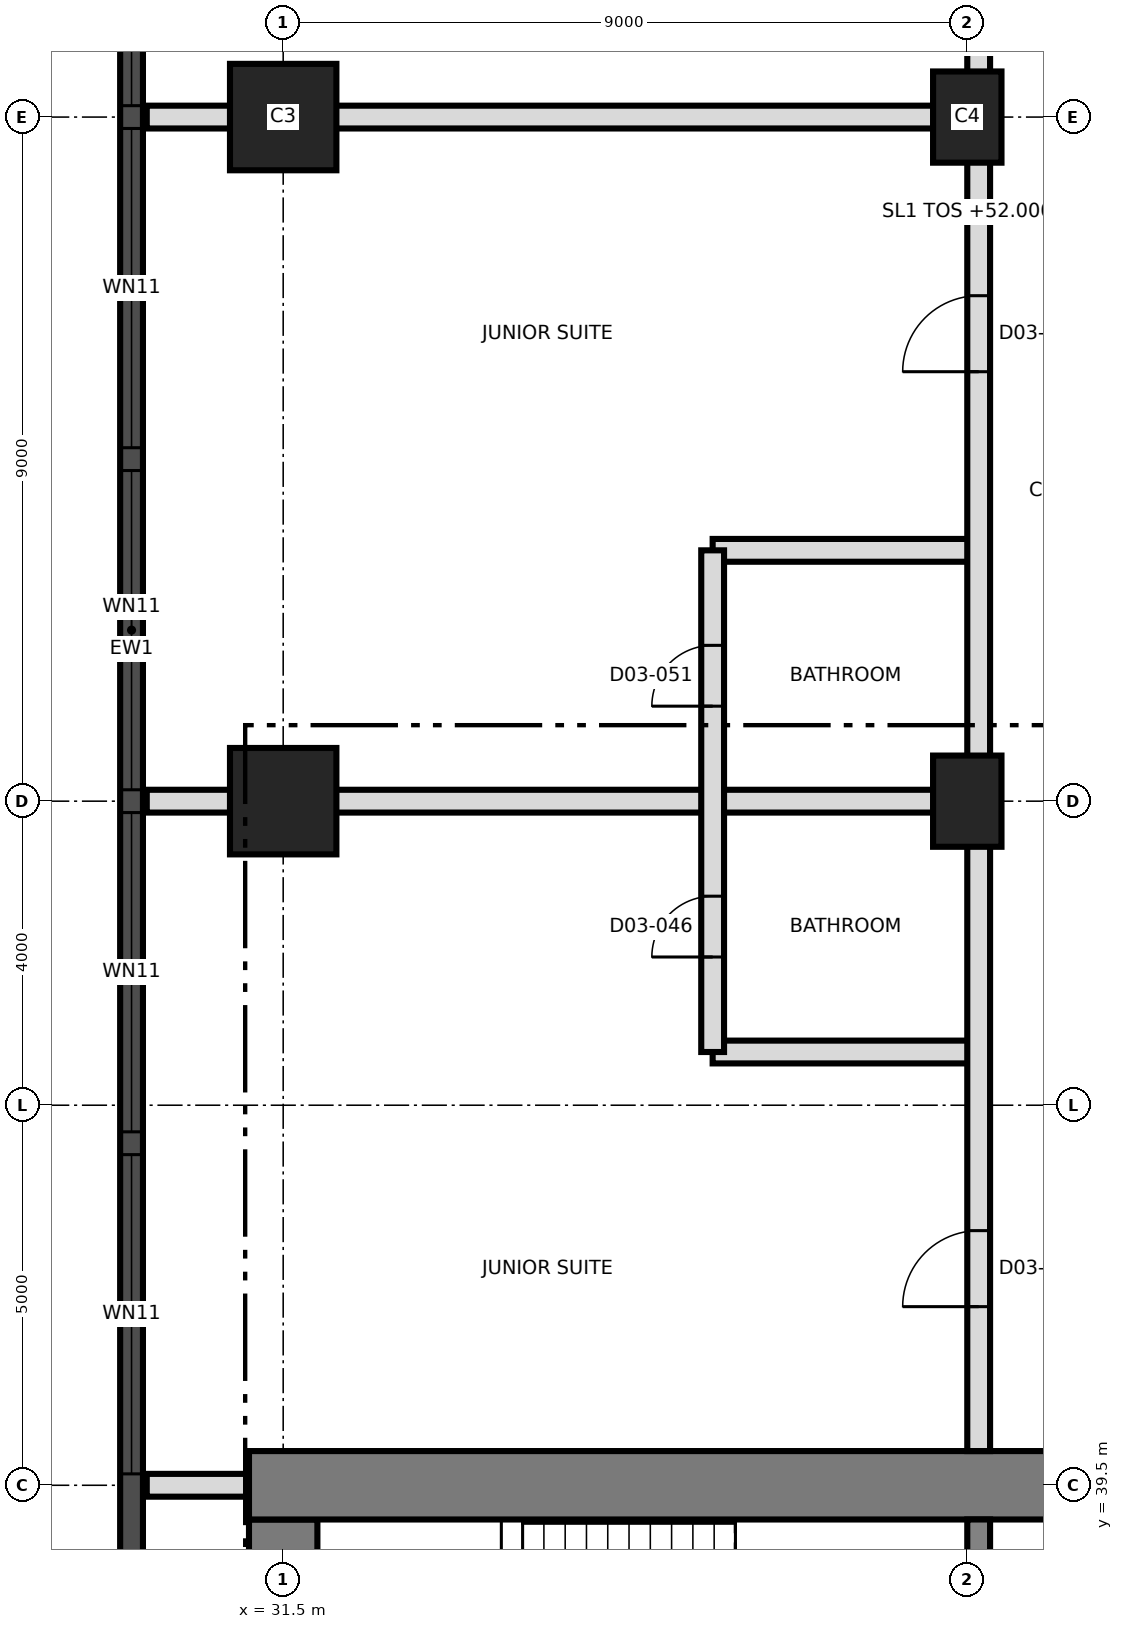
"""IFC4 building model, lengths in metres.
Left out: names, types, materials, properties, quantities, classifications, styles, units other than length and angle.
Written with IfcOpenShell. Run it as: python <this file> out.ifc"""

import sys

from ifc_helpers import new_model, si_unit, direction, frame, frame_2d, origin, origin_2d, place, context, subcontext, project, spatial, rectangle, extrude, element, fill, save


model = new_model("IFC4")
c1 = context("Model", 3, precision=1e-05, world=origin(), true_north=direction((0.0, 1.0)))
c2 = subcontext(c1, "Body", "Model", "MODEL_VIEW")
j1 = project(units=[si_unit("LENGTHUNIT", "METRE"), si_unit("PLANEANGLEUNIT", "RADIAN")], contexts=[c1])
p1 = place(None, origin())
s1 = spatial("IfcSite", under=j1, at=p1, CompositionType="ELEMENT")
p2 = place(p1, origin())
s2 = spatial("IfcBuilding", under=s1, at=p2, CompositionType="ELEMENT")
p3 = place(p2, frame((0.0, 0.0, 52.0)))
s3 = spatial("IfcBuildingStorey", under=s2, at=p3, CompositionType="ELEMENT", Elevation=52.0)
p4 = place(p3, frame((31.5, 21.95, 0.0), z_axis=(0.0, 0.0, 1.0), x_axis=(0.0, 1.0, 0.0)))
e1 = element("IfcWall", 1, at=p4, inside=s3, PredefinedType="SHEAR", context=c2, shape_type="SweptSolid", body=[
    extrude(rectangle(XDim=17.1, YDim=0.9, at=frame_2d((8.55, 0.0))), origin(), (0.0, 0.0, 1.0), 3.7),
])
p5 = place(p3, frame((31.05, 39.5, 0.0), z_axis=(0.0, 0.0, 1.0), x_axis=(1.0, 0.0, 0.0)))
e2 = element("IfcWall", 2, at=p5, inside=s3, PredefinedType="SHEAR", context=c2, shape_type="SweptSolid", body=[
    extrude(rectangle(XDim=27.0, YDim=0.9, at=frame_2d((13.5, 0.0))), origin(), (0.0, 0.0, 1.0), 3.7),
])
p6 = place(p5, frame((10.65, 0.0, 0.0)))
e3 = element("IfcOpeningElement", 3, at=p6, cuts=e2, PredefinedType="OPENING", context=c2, shape_type="SweptSolid", body=[
    extrude(rectangle(XDim=1.2, YDim=2.1, at=frame_2d((0.6, 1.05))), frame((0.0, 0.46, 0.0), z_axis=(0.0, -1.0, 0.0), x_axis=(1.0, 0.0, 0.0)), (0.0, 0.0, 1.0), 0.92),
])
p7 = place(p3, frame((40.65, 33.5, 0.0), z_axis=(0.0, 0.0, 1.0), x_axis=(0.0, 1.0, 0.0)))
e4 = element("IfcWall", 4, at=p7, inside=s3, PredefinedType="SHEAR", context=c2, shape_type="SweptSolid", body=[
    extrude(rectangle(XDim=5.55, YDim=0.3, at=frame_2d((2.775, 0.0))), origin(), (0.0, 0.0, 1.0), 3.7),
])
p8 = place(p3, frame((31.5, 48.5, 0.0), z_axis=(0.0, 0.0, 1.0), x_axis=(1.0, 0.0, 0.0)))
e5 = element("IfcColumn", 5, at=p8, inside=s3, PredefinedType="COLUMN", context=c2, shape_type="SweptSolid", body=[
    extrude(rectangle(XDim=1.4, YDim=1.4, at=origin_2d()), origin(), (0.0, 0.0, 1.0), 3.7),
])
p9 = place(p3, frame((40.5, 48.5, 0.0), z_axis=(0.0, 0.0, 1.0), x_axis=(0.0, 1.0, 0.0)))
e6 = element("IfcColumn", 6, at=p9, inside=s3, PredefinedType="COLUMN", context=c2, shape_type="SweptSolid", body=[
    extrude(rectangle(XDim=1.2, YDim=0.9, at=origin_2d()), origin(), (0.0, 0.0, 1.0), 3.7),
])
p10 = place(p3, frame((31.5, 57.5, 0.0), z_axis=(0.0, 0.0, 1.0), x_axis=(1.0, 0.0, 0.0)))
e7 = element("IfcColumn", 7, at=p10, inside=s3, PredefinedType="COLUMN", context=c2, shape_type="SweptSolid", body=[
    extrude(rectangle(XDim=1.4, YDim=1.4, at=origin_2d()), origin(), (0.0, 0.0, 1.0), 3.7),
])
p11 = place(p3, frame((40.5, 57.5, 0.0), z_axis=(0.0, 0.0, 1.0), x_axis=(0.0, 1.0, 0.0)))
e8 = element("IfcColumn", 8, at=p11, inside=s3, PredefinedType="COLUMN", context=c2, shape_type="SweptSolid", body=[
    extrude(rectangle(XDim=1.2, YDim=0.9, at=origin_2d()), origin(), (0.0, 0.0, 1.0), 3.7),
])
p12 = place(p3, frame((29.505, 66.986, 0.0), z_axis=(0.0, 0.0, 1.0), x_axis=(0.0, -1.0, 0.0)))
e9 = element("IfcWall", 9, at=p12, inside=s3, PredefinedType="SOLIDWALL", context=c2, shape_type="SweptSolid", body=[
    extrude(rectangle(XDim=32.976, YDim=0.3, at=frame_2d((16.488, 0.0))), origin(), (0.0, 0.0, 1.0), 3.4),
])
p13 = place(p12, frame((1.593, 0.0, 0.3)))
e10 = element("IfcOpeningElement", 10, at=p13, cuts=e9, PredefinedType="OPENING", context=c2, shape_type="SweptSolid", body=[
    extrude(rectangle(XDim=1.8, YDim=2.4, at=frame_2d((0.9, 1.2))), frame((0.0, 0.16, 0.0), z_axis=(0.0, -1.0, 0.0), x_axis=(1.0, 0.0, 0.0)), (0.0, 0.0, 1.0), 0.32),
])
p14 = place(p12, frame((5.136, 0.0, 0.9)))
e11 = element("IfcOpeningElement", 11, at=p14, cuts=e9, PredefinedType="OPENING", context=c2, shape_type="SweptSolid", body=[
    extrude(rectangle(XDim=4.2, YDim=1.5, at=frame_2d((2.1, 0.75))), frame((0.0, 0.16, 0.0), z_axis=(0.0, -1.0, 0.0), x_axis=(1.0, 0.0, 0.0)), (0.0, 0.0, 1.0), 0.32),
])
p15 = place(p12, frame((9.636, 0.0, 0.9)))
e12 = element("IfcOpeningElement", 12, at=p15, cuts=e9, PredefinedType="OPENING", context=c2, shape_type="SweptSolid", body=[
    extrude(rectangle(XDim=4.2, YDim=1.5, at=frame_2d((2.1, 0.75))), frame((0.0, 0.16, 0.0), z_axis=(0.0, -1.0, 0.0), x_axis=(1.0, 0.0, 0.0)), (0.0, 0.0, 1.0), 0.32),
])
p16 = place(p12, frame((14.136, 0.0, 0.9)))
e13 = element("IfcOpeningElement", 13, at=p16, cuts=e9, PredefinedType="OPENING", context=c2, shape_type="SweptSolid", body=[
    extrude(rectangle(XDim=4.2, YDim=1.5, at=frame_2d((2.1, 0.75))), frame((0.0, 0.16, 0.0), z_axis=(0.0, -1.0, 0.0), x_axis=(1.0, 0.0, 0.0)), (0.0, 0.0, 1.0), 0.32),
])
p17 = place(p12, frame((18.636, 0.0, 0.9)))
e14 = element("IfcOpeningElement", 14, at=p17, cuts=e9, PredefinedType="OPENING", context=c2, shape_type="SweptSolid", body=[
    extrude(rectangle(XDim=4.2, YDim=1.5, at=frame_2d((2.1, 0.75))), frame((0.0, 0.16, 0.0), z_axis=(0.0, -1.0, 0.0), x_axis=(1.0, 0.0, 0.0)), (0.0, 0.0, 1.0), 0.32),
])
p18 = place(p12, frame((23.136, 0.0, 0.9)))
e15 = element("IfcOpeningElement", 15, at=p18, cuts=e9, PredefinedType="OPENING", context=c2, shape_type="SweptSolid", body=[
    extrude(rectangle(XDim=4.2, YDim=1.5, at=frame_2d((2.1, 0.75))), frame((0.0, 0.16, 0.0), z_axis=(0.0, -1.0, 0.0), x_axis=(1.0, 0.0, 0.0)), (0.0, 0.0, 1.0), 0.32),
])
p19 = place(p12, frame((29.331, 0.0, 0.3)))
e16 = element("IfcOpeningElement", 16, at=p19, cuts=e9, PredefinedType="OPENING", context=c2, shape_type="SweptSolid", body=[
    extrude(rectangle(XDim=1.8, YDim=2.4, at=frame_2d((0.9, 1.2))), frame((0.0, 0.16, 0.0), z_axis=(0.0, -1.0, 0.0), x_axis=(1.0, 0.0, 0.0)), (0.0, 0.0, 1.0), 0.32),
])
p20 = place(p3, frame((29.705, 39.5, 0.0), z_axis=(0.0, 0.0, 1.0), x_axis=(1.0, 0.0, 0.0)))
e17 = element("IfcWall", 17, at=p20, inside=s3, PredefinedType="PARTITIONING", context=c2, shape_type="SweptSolid", body=[
    extrude(rectangle(XDim=1.325, YDim=0.3, at=frame_2d((0.663, 0.0))), origin(), (0.0, 0.0, 1.0), 3.4),
])
p21 = place(p3, frame((37.15, 45.2, 0.0), z_axis=(0.0, 0.0, 1.0), x_axis=(1.0, 0.0, 0.0)))
e18 = element("IfcWall", 18, at=p21, inside=s3, PredefinedType="PARTITIONING", context=c2, shape_type="SweptSolid", body=[
    extrude(rectangle(XDim=3.5, YDim=0.3, at=frame_2d((1.75, 0.0))), origin(), (0.0, 0.0, 1.0), 3.4),
])
p22 = place(p3, frame((29.705, 48.5, 0.0), z_axis=(0.0, 0.0, 1.0), x_axis=(1.0, 0.0, 0.0)))
e19 = element("IfcWall", 19, at=p22, inside=s3, PredefinedType="PARTITIONING", context=c2, shape_type="SweptSolid", body=[
    extrude(rectangle(XDim=10.945, YDim=0.3, at=frame_2d((5.472, 0.0))), origin(), (0.0, 0.0, 1.0), 3.4),
])
p23 = place(p3, frame((37.15, 51.8, 0.0), z_axis=(0.0, 0.0, 1.0), x_axis=(1.0, 0.0, 0.0)))
e20 = element("IfcWall", 20, at=p23, inside=s3, PredefinedType="PARTITIONING", context=c2, shape_type="SweptSolid", body=[
    extrude(rectangle(XDim=3.5, YDim=0.3, at=frame_2d((1.75, 0.0))), origin(), (0.0, 0.0, 1.0), 3.4),
])
p24 = place(p3, frame((29.705, 57.5, 0.0), z_axis=(0.0, 0.0, 1.0), x_axis=(1.0, 0.0, 0.0)))
e21 = element("IfcWall", 21, at=p24, inside=s3, PredefinedType="PARTITIONING", context=c2, shape_type="SweptSolid", body=[
    extrude(rectangle(XDim=10.945, YDim=0.3, at=frame_2d((5.472, 0.0))), origin(), (0.0, 0.0, 1.0), 3.4),
])
p25 = place(p3, frame((37.15, 45.2, 0.0), z_axis=(0.0, 0.0, 1.0), x_axis=(0.0, 1.0, 0.0)))
e22 = element("IfcWall", 22, at=p25, inside=s3, PredefinedType="PARTITIONING", context=c2, shape_type="SweptSolid", body=[
    extrude(rectangle(XDim=6.6, YDim=0.3, at=frame_2d((3.3, 0.0))), origin(), (0.0, 0.0, 1.0), 3.4),
])
p26 = place(p25, frame((1.25, 0.0, 0.0)))
e23 = element("IfcOpeningElement", 23, at=p26, cuts=e22, PredefinedType="OPENING", context=c2, shape_type="SweptSolid", body=[
    extrude(rectangle(XDim=0.8, YDim=2.1, at=frame_2d((0.4, 1.05))), frame((0.0, 0.16, 0.0), z_axis=(0.0, -1.0, 0.0), x_axis=(1.0, 0.0, 0.0)), (0.0, 0.0, 1.0), 0.32),
])
p27 = place(p25, frame((4.55, 0.0, 0.0)))
e24 = element("IfcOpeningElement", 24, at=p27, cuts=e22, PredefinedType="OPENING", context=c2, shape_type="SweptSolid", body=[
    extrude(rectangle(XDim=0.8, YDim=2.1, at=frame_2d((0.4, 1.05))), frame((0.0, 0.16, 0.0), z_axis=(0.0, -1.0, 0.0), x_axis=(1.0, 0.0, 0.0)), (0.0, 0.0, 1.0), 0.32),
])
p28 = place(p3, frame((40.65, 39.95, 0.0), z_axis=(0.0, 0.0, 1.0), x_axis=(0.0, 1.0, 0.0)))
e25 = element("IfcWall", 25, at=p28, inside=s3, PredefinedType="PARTITIONING", context=c2, shape_type="SweptSolid", body=[
    extrude(rectangle(XDim=37.05, YDim=0.3, at=frame_2d((18.525, 0.0))), origin(), (0.0, 0.0, 1.0), 3.4),
])
p29 = place(p28, frame((1.9, 0.0, 0.0)))
e26 = element("IfcOpeningElement", 26, at=p29, cuts=e25, PredefinedType="OPENING", context=c2, shape_type="SweptSolid", body=[
    extrude(rectangle(XDim=1.0, YDim=2.4, at=frame_2d((0.5, 1.2))), frame((0.0, 0.16, 0.0), z_axis=(0.0, -1.0, 0.0), x_axis=(1.0, 0.0, 0.0)), (0.0, 0.0, 1.0), 0.32),
])
p30 = place(p28, frame((14.2, 0.0, 0.0)))
e27 = element("IfcOpeningElement", 27, at=p30, cuts=e25, PredefinedType="OPENING", context=c2, shape_type="SweptSolid", body=[
    extrude(rectangle(XDim=1.0, YDim=2.4, at=frame_2d((0.5, 1.2))), frame((0.0, 0.16, 0.0), z_axis=(0.0, -1.0, 0.0), x_axis=(1.0, 0.0, 0.0)), (0.0, 0.0, 1.0), 0.32),
])
p31 = place(p28, frame((21.05, 0.0, 0.0)))
e28 = element("IfcOpeningElement", 28, at=p31, cuts=e25, PredefinedType="OPENING", context=c2, shape_type="SweptSolid", body=[
    extrude(rectangle(XDim=1.0, YDim=2.4, at=frame_2d((0.5, 1.2))), frame((0.0, 0.16, 0.0), z_axis=(0.0, -1.0, 0.0), x_axis=(1.0, 0.0, 0.0)), (0.0, 0.0, 1.0), 0.32),
])
p32 = place(p14, origin())
e29 = element("IfcWindow", 29, at=p32, inside=s3, PartitioningType="SINGLE_PANEL", PredefinedType="WINDOW", context=c2, shape_type="SweptSolid", body=[
    extrude(rectangle(XDim=4.2, YDim=1.5, at=frame_2d((2.1, 0.75))), frame((0.0, 0.03, 0.0), z_axis=(0.0, -1.0, 0.0), x_axis=(1.0, 0.0, 0.0)), (0.0, 0.0, 1.0), 0.06),
])
fill(e11, e29)
p33 = place(p15, origin())
e30 = element("IfcWindow", 30, at=p33, inside=s3, PartitioningType="SINGLE_PANEL", PredefinedType="WINDOW", context=c2, shape_type="SweptSolid", body=[
    extrude(rectangle(XDim=4.2, YDim=1.5, at=frame_2d((2.1, 0.75))), frame((0.0, 0.03, 0.0), z_axis=(0.0, -1.0, 0.0), x_axis=(1.0, 0.0, 0.0)), (0.0, 0.0, 1.0), 0.06),
])
fill(e12, e30)
p34 = place(p16, origin())
e31 = element("IfcWindow", 31, at=p34, inside=s3, PartitioningType="SINGLE_PANEL", PredefinedType="WINDOW", context=c2, shape_type="SweptSolid", body=[
    extrude(rectangle(XDim=4.2, YDim=1.5, at=frame_2d((2.1, 0.75))), frame((0.0, 0.03, 0.0), z_axis=(0.0, -1.0, 0.0), x_axis=(1.0, 0.0, 0.0)), (0.0, 0.0, 1.0), 0.06),
])
fill(e13, e31)
p35 = place(p17, origin())
e32 = element("IfcWindow", 32, at=p35, inside=s3, PartitioningType="SINGLE_PANEL", PredefinedType="WINDOW", context=c2, shape_type="SweptSolid", body=[
    extrude(rectangle(XDim=4.2, YDim=1.5, at=frame_2d((2.1, 0.75))), frame((0.0, 0.03, 0.0), z_axis=(0.0, -1.0, 0.0), x_axis=(1.0, 0.0, 0.0)), (0.0, 0.0, 1.0), 0.06),
])
fill(e14, e32)
p36 = place(p18, origin())
e33 = element("IfcWindow", 33, at=p36, inside=s3, PartitioningType="SINGLE_PANEL", PredefinedType="WINDOW", context=c2, shape_type="SweptSolid", body=[
    extrude(rectangle(XDim=4.2, YDim=1.5, at=frame_2d((2.1, 0.75))), frame((0.0, 0.03, 0.0), z_axis=(0.0, -1.0, 0.0), x_axis=(1.0, 0.0, 0.0)), (0.0, 0.0, 1.0), 0.06),
])
fill(e15, e33)
p37 = place(p26, origin())
e34 = element("IfcDoor", 34, at=p37, inside=s3, OperationType="SINGLE_SWING_LEFT", PredefinedType="DOOR", context=c2, shape_type="SweptSolid", body=[
    extrude(rectangle(XDim=0.8, YDim=2.1, at=frame_2d((0.4, 1.05))), frame((0.0, 0.025, 0.0), z_axis=(0.0, -1.0, 0.0), x_axis=(1.0, 0.0, 0.0)), (0.0, 0.0, 1.0), 0.05),
])
fill(e23, e34)
p38 = place(p29, origin())
e35 = element("IfcDoor", 35, at=p38, inside=s3, OperationType="SINGLE_SWING_RIGHT", PredefinedType="DOOR", context=c2, shape_type="SweptSolid", body=[
    extrude(rectangle(XDim=1.0, YDim=2.4, at=frame_2d((0.5, 1.2))), frame((0.0, 0.025, 0.0), z_axis=(0.0, -1.0, 0.0), x_axis=(1.0, 0.0, 0.0)), (0.0, 0.0, 1.0), 0.05),
])
fill(e26, e35)
p39 = place(p27, origin())
e36 = element("IfcDoor", 36, at=p39, inside=s3, OperationType="SINGLE_SWING_RIGHT", PredefinedType="DOOR", context=c2, shape_type="SweptSolid", body=[
    extrude(rectangle(XDim=0.8, YDim=2.1, at=frame_2d((0.4, 1.05))), frame((0.0, 0.025, 0.0), z_axis=(0.0, -1.0, 0.0), x_axis=(1.0, 0.0, 0.0)), (0.0, 0.0, 1.0), 0.05),
])
fill(e24, e36)
p40 = place(p30, origin())
e37 = element("IfcDoor", 37, at=p40, inside=s3, OperationType="SINGLE_SWING_LEFT", PredefinedType="DOOR", context=c2, shape_type="SweptSolid", body=[
    extrude(rectangle(XDim=1.0, YDim=2.4, at=frame_2d((0.5, 1.2))), frame((0.0, 0.025, 0.0), z_axis=(0.0, -1.0, 0.0), x_axis=(1.0, 0.0, 0.0)), (0.0, 0.0, 1.0), 0.05),
])
fill(e27, e37)
save(model, sys.argv[1])
